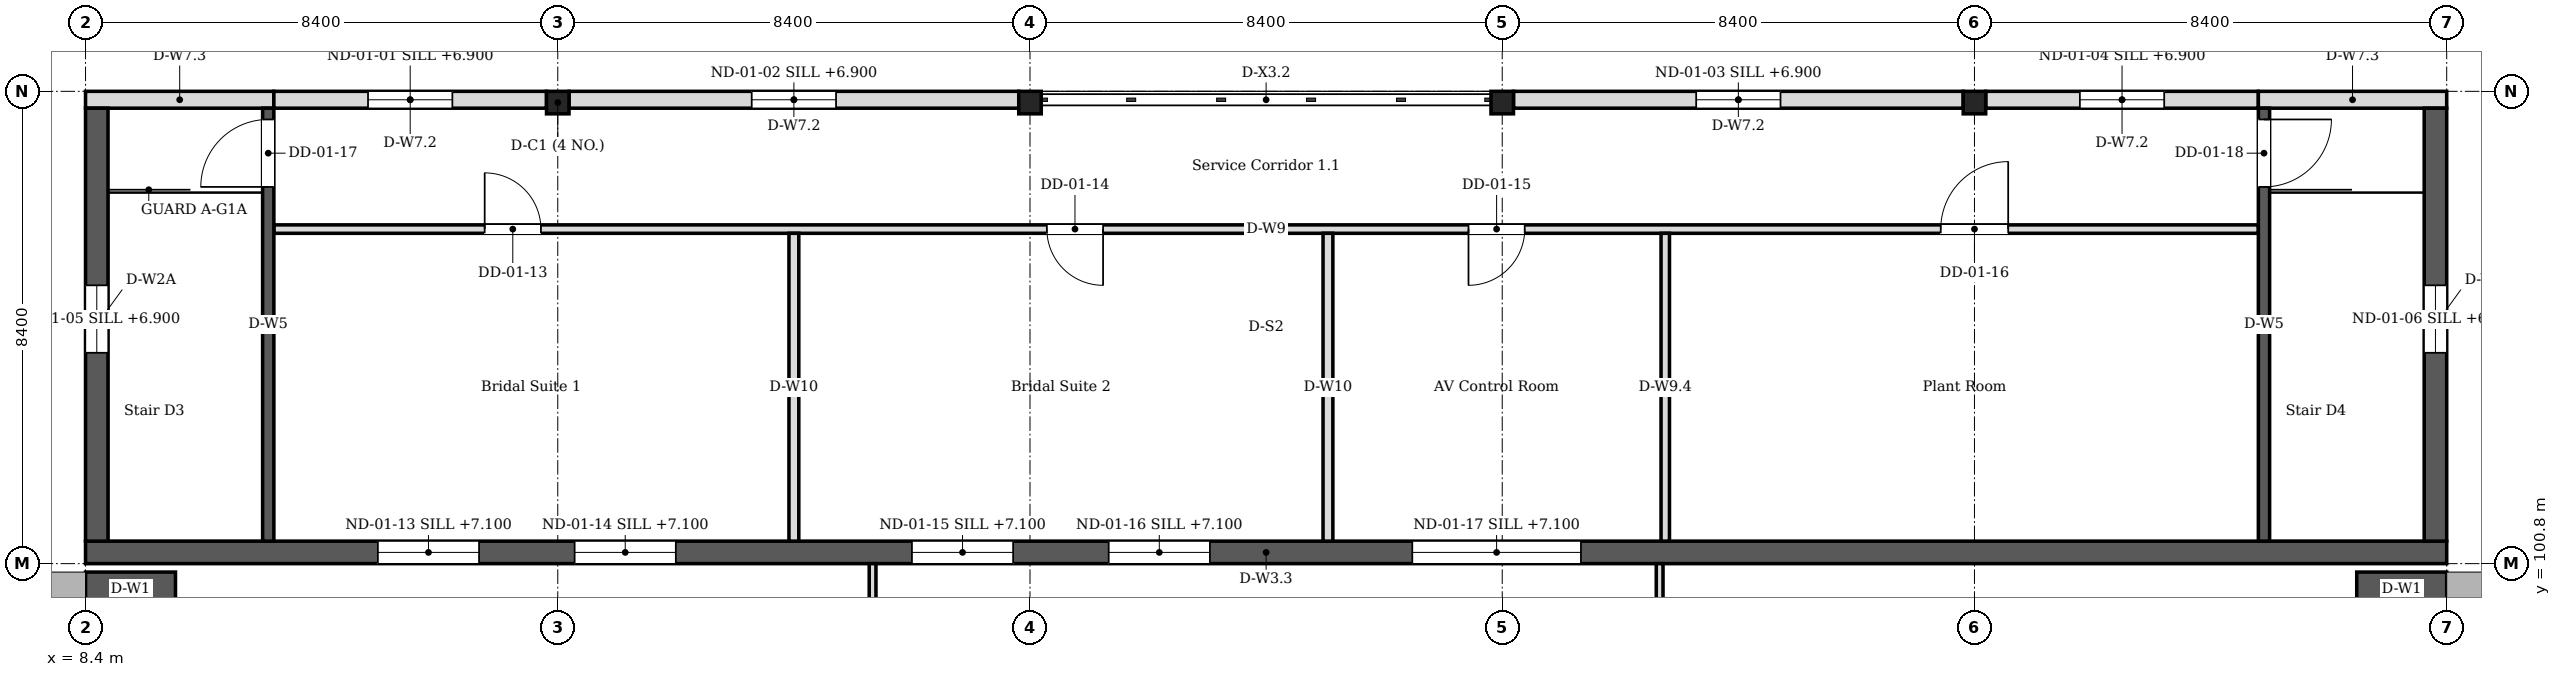
"""IFC4 building model, lengths in metres.
Left out: names, types, materials, properties, quantities, classifications, styles, units other than length and angle.
Written with IfcOpenShell. Run it as: python <this file> out.ifc"""

import sys

from ifc_helpers import new_model, si_unit, direction, frame, frame_2d, origin, origin_2d, place, context, subcontext, project, spatial, rectangle, i_section, extrude, element, fill, save


model = new_model("IFC4")
c1 = context("Model", 3, precision=1e-05, world=origin(), true_north=direction((0.0, 1.0)))
c2 = subcontext(c1, "Body", "Model", "MODEL_VIEW")
j1 = project(units=[si_unit("LENGTHUNIT", "METRE"), si_unit("PLANEANGLEUNIT", "RADIAN")], contexts=[c1])
p1 = place(None, origin())
s1 = spatial("IfcSite", under=j1, at=p1, CompositionType="ELEMENT")
p2 = place(p1, origin())
s2 = spatial("IfcBuilding", under=s1, at=p2, CompositionType="ELEMENT")
p3 = place(p2, origin())
s3 = spatial("IfcBuildingStorey", under=s2, at=p3, CompositionType="ELEMENT", Elevation=0.0)
p4 = place(p3, frame((8.4, 100.35, 0.0), z_axis=(0.0, 0.0, 1.0), x_axis=(1.0, 0.0, 0.0)))
e1 = element("IfcWall", 1, at=p4, inside=s3, PredefinedType="SOLIDWALL", context=c2, shape_type="SweptSolid", body=[
    extrude(rectangle(XDim=1.6, YDim=0.6, at=frame_2d((0.8, 0.0))), origin(), (0.0, 0.0, 1.0), 14.467),
])
p5 = place(p3, frame((50.4, 100.35, 0.0), z_axis=(0.0, 0.0, 1.0), x_axis=(-1.0, 0.0, 0.0)))
e2 = element("IfcWall", 2, at=p5, inside=s3, PredefinedType="SOLIDWALL", context=c2, shape_type="SweptSolid", body=[
    extrude(rectangle(XDim=1.6, YDim=0.6, at=frame_2d((0.8, 0.0))), origin(), (0.0, 0.0, 1.0), 14.467),
])
p6 = place(p2, frame((0.0, 0.0, 6.0)))
s4 = spatial("IfcBuildingStorey", under=s2, at=p6, CompositionType="ELEMENT", Elevation=6.0)
p7 = place(p6, frame((8.4, 101.0, 0.0), z_axis=(0.0, 0.0, 1.0), x_axis=(1.0, 0.0, 0.0)))
e3 = element("IfcWall", 3, at=p7, inside=s4, PredefinedType="SOLIDWALL", context=c2, shape_type="SweptSolid", body=[
    extrude(rectangle(XDim=42.0, YDim=0.4, at=frame_2d((21.0, 0.0))), origin(), (0.0, 0.0, 1.0), 3.92),
])
p8 = place(p7, frame((5.2, 0.0, 1.1)))
e4 = element("IfcOpeningElement", 4, at=p8, cuts=e3, PredefinedType="OPENING", context=c2, shape_type="SweptSolid", body=[
    extrude(rectangle(XDim=1.8, YDim=1.5, at=frame_2d((0.9, 0.75))), frame((0.0, 0.21, 0.0), z_axis=(0.0, -1.0, 0.0), x_axis=(1.0, 0.0, 0.0)), (0.0, 0.0, 1.0), 0.42),
])
p9 = place(p7, frame((8.7, 0.0, 1.1)))
e5 = element("IfcOpeningElement", 5, at=p9, cuts=e3, PredefinedType="OPENING", context=c2, shape_type="SweptSolid", body=[
    extrude(rectangle(XDim=1.8, YDim=1.5, at=frame_2d((0.9, 0.75))), frame((0.0, 0.21, 0.0), z_axis=(0.0, -1.0, 0.0), x_axis=(1.0, 0.0, 0.0)), (0.0, 0.0, 1.0), 0.42),
])
p10 = place(p7, frame((14.7, 0.0, 1.1)))
e6 = element("IfcOpeningElement", 6, at=p10, cuts=e3, PredefinedType="OPENING", context=c2, shape_type="SweptSolid", body=[
    extrude(rectangle(XDim=1.8, YDim=1.5, at=frame_2d((0.9, 0.75))), frame((0.0, 0.21, 0.0), z_axis=(0.0, -1.0, 0.0), x_axis=(1.0, 0.0, 0.0)), (0.0, 0.0, 1.0), 0.42),
])
p11 = place(p7, frame((18.2, 0.0, 1.1)))
e7 = element("IfcOpeningElement", 7, at=p11, cuts=e3, PredefinedType="OPENING", context=c2, shape_type="SweptSolid", body=[
    extrude(rectangle(XDim=1.8, YDim=1.5, at=frame_2d((0.9, 0.75))), frame((0.0, 0.21, 0.0), z_axis=(0.0, -1.0, 0.0), x_axis=(1.0, 0.0, 0.0)), (0.0, 0.0, 1.0), 0.42),
])
p12 = place(p7, frame((23.6, 0.0, 1.1)))
e8 = element("IfcOpeningElement", 8, at=p12, cuts=e3, PredefinedType="OPENING", context=c2, shape_type="SweptSolid", body=[
    extrude(rectangle(XDim=3.0, YDim=1.5, at=frame_2d((1.5, 0.75))), frame((0.0, 0.21, 0.0), z_axis=(0.0, -1.0, 0.0), x_axis=(1.0, 0.0, 0.0)), (0.0, 0.0, 1.0), 0.42),
])
p13 = place(p6, frame((8.6, 101.2, 0.0), z_axis=(0.0, 0.0, 1.0), x_axis=(0.0, 1.0, 0.0)))
e9 = element("IfcWall", 9, at=p13, inside=s4, PredefinedType="SOLIDWALL", context=c2, shape_type="SweptSolid", body=[
    extrude(rectangle(XDim=7.7, YDim=0.4, at=frame_2d((3.85, 0.0))), origin(), (0.0, 0.0, 1.0), 3.92),
])
p14 = place(p13, frame((3.35, 0.0, 0.9)))
e10 = element("IfcOpeningElement", 10, at=p14, cuts=e9, PredefinedType="OPENING", context=c2, shape_type="SweptSolid", body=[
    extrude(rectangle(XDim=1.2, YDim=1.5, at=frame_2d((0.6, 0.75))), frame((0.0, 0.21, 0.0), z_axis=(0.0, -1.0, 0.0), x_axis=(1.0, 0.0, 0.0)), (0.0, 0.0, 1.0), 0.42),
])
p15 = place(p6, frame((11.65, 101.2, 0.0), z_axis=(0.0, 0.0, 1.0), x_axis=(0.0, 1.0, 0.0)))
e11 = element("IfcWall", 11, at=p15, inside=s4, PredefinedType="SOLIDWALL", context=c2, shape_type="SweptSolid", body=[
    extrude(rectangle(XDim=7.7, YDim=0.2, at=frame_2d((3.85, 0.0))), origin(), (0.0, 0.0, 1.0), 3.92),
])
p16 = place(p15, frame((6.3, 0.0, 0.0)))
e12 = element("IfcOpeningElement", 12, at=p16, cuts=e11, PredefinedType="OPENING", context=c2, shape_type="SweptSolid", body=[
    extrude(rectangle(XDim=1.2, YDim=2.1, at=frame_2d((0.6, 1.05))), frame((0.0, 0.11, 0.0), z_axis=(0.0, -1.0, 0.0), x_axis=(1.0, 0.0, 0.0)), (0.0, 0.0, 1.0), 0.22),
])
p17 = place(p6, frame((50.2, 101.2, 0.0), z_axis=(0.0, 0.0, 1.0), x_axis=(0.0, 1.0, 0.0)))
e13 = element("IfcWall", 13, at=p17, inside=s4, PredefinedType="SOLIDWALL", context=c2, shape_type="SweptSolid", body=[
    extrude(rectangle(XDim=7.7, YDim=0.4, at=frame_2d((3.85, 0.0))), origin(), (0.0, 0.0, 1.0), 3.92),
])
p18 = place(p17, frame((3.35, 0.0, 0.9)))
e14 = element("IfcOpeningElement", 14, at=p18, cuts=e13, PredefinedType="OPENING", context=c2, shape_type="SweptSolid", body=[
    extrude(rectangle(XDim=1.2, YDim=1.5, at=frame_2d((0.6, 0.75))), frame((0.0, 0.21, 0.0), z_axis=(0.0, -1.0, 0.0), x_axis=(1.0, 0.0, 0.0)), (0.0, 0.0, 1.0), 0.42),
])
p19 = place(p6, frame((47.15, 101.2, 0.0), z_axis=(0.0, 0.0, 1.0), x_axis=(0.0, 1.0, 0.0)))
e15 = element("IfcWall", 15, at=p19, inside=s4, PredefinedType="SOLIDWALL", context=c2, shape_type="SweptSolid", body=[
    extrude(rectangle(XDim=7.7, YDim=0.2, at=frame_2d((3.85, 0.0))), origin(), (0.0, 0.0, 1.0), 3.92),
])
p20 = place(p19, frame((6.3, 0.0, 0.0)))
e16 = element("IfcOpeningElement", 16, at=p20, cuts=e15, PredefinedType="OPENING", context=c2, shape_type="SweptSolid", body=[
    extrude(rectangle(XDim=1.2, YDim=2.1, at=frame_2d((0.6, 1.05))), frame((0.0, 0.11, 0.0), z_axis=(0.0, -1.0, 0.0), x_axis=(1.0, 0.0, 0.0)), (0.0, 0.0, 1.0), 0.22),
])
for number, where, z_axis, x_axis in (
    (17, (16.8, 109.0, 0.0), (0.0, 0.0, 1.0), (1.0, 0.0, 0.0)),
    (18, (25.2, 109.0, 0.0), (0.0, 0.0, 1.0), (1.0, 0.0, 0.0)),
    (19, (33.6, 109.0, 0.0), (0.0, 0.0, 1.0), (1.0, 0.0, 0.0)),
    (20, (42.0, 109.0, 0.0), (0.0, 0.0, 1.0), (1.0, 0.0, 0.0)),
):
    element("IfcColumn", number, at=place(p6, frame(where, z_axis=z_axis, x_axis=x_axis)), inside=s4, PredefinedType="COLUMN", context=c2, shape_type="SweptSolid", body=[
        extrude(i_section(OverallWidth=0.4, OverallDepth=0.4, WebThickness=0.013, FlangeThickness=0.021, FilletRadius=0.022, at=origin_2d()), origin(), (0.0, 0.0, 1.0), 4.2),
    ])
p21 = place(p6, frame((8.4, 109.05, 0.0), z_axis=(0.0, 0.0, 1.0), x_axis=(1.0, 0.0, 0.0)))
e21 = element("IfcWall", 21, at=p21, inside=s4, PredefinedType="SOLIDWALL", context=c2, shape_type="SweptSolid", body=[
    extrude(rectangle(XDim=3.35, YDim=0.3, at=frame_2d((1.675, 0.0))), origin(), (0.0, 0.0, 1.0), 3.92),
])
p22 = place(p6, frame((11.75, 109.05, 0.0), z_axis=(0.0, 0.0, 1.0), x_axis=(1.0, 0.0, 0.0)))
e22 = element("IfcWall", 22, at=p22, inside=s4, PredefinedType="SOLIDWALL", context=c2, shape_type="SweptSolid", body=[
    extrude(rectangle(XDim=4.85, YDim=0.3, at=frame_2d((2.425, 0.0))), origin(), (0.0, 0.0, 1.0), 3.42),
])
p23 = place(p22, frame((1.675, 0.0, 0.9)))
e23 = element("IfcOpeningElement", 23, at=p23, cuts=e22, PredefinedType="OPENING", context=c2, shape_type="SweptSolid", body=[
    extrude(rectangle(XDim=1.5, YDim=1.2, at=frame_2d((0.75, 0.6))), frame((0.0, 0.16, 0.0), z_axis=(0.0, -1.0, 0.0), x_axis=(1.0, 0.0, 0.0)), (0.0, 0.0, 1.0), 0.32),
])
p24 = place(p6, frame((17.0, 109.05, 0.0), z_axis=(0.0, 0.0, 1.0), x_axis=(1.0, 0.0, 0.0)))
e24 = element("IfcWall", 24, at=p24, inside=s4, PredefinedType="SOLIDWALL", context=c2, shape_type="SweptSolid", body=[
    extrude(rectangle(XDim=8.0, YDim=0.3, at=frame_2d((4.0, 0.0))), origin(), (0.0, 0.0, 1.0), 3.42),
])
p25 = place(p24, frame((3.25, 0.0, 0.9)))
e25 = element("IfcOpeningElement", 25, at=p25, cuts=e24, PredefinedType="OPENING", context=c2, shape_type="SweptSolid", body=[
    extrude(rectangle(XDim=1.5, YDim=1.2, at=frame_2d((0.75, 0.6))), frame((0.0, 0.16, 0.0), z_axis=(0.0, -1.0, 0.0), x_axis=(1.0, 0.0, 0.0)), (0.0, 0.0, 1.0), 0.32),
])
p26 = place(p6, frame((33.8, 109.05, 0.0), z_axis=(0.0, 0.0, 1.0), x_axis=(1.0, 0.0, 0.0)))
e26 = element("IfcWall", 26, at=p26, inside=s4, PredefinedType="SOLIDWALL", context=c2, shape_type="SweptSolid", body=[
    extrude(rectangle(XDim=8.0, YDim=0.3, at=frame_2d((4.0, 0.0))), origin(), (0.0, 0.0, 1.0), 3.42),
])
p27 = place(p26, frame((3.25, 0.0, 0.9)))
e27 = element("IfcOpeningElement", 27, at=p27, cuts=e26, PredefinedType="OPENING", context=c2, shape_type="SweptSolid", body=[
    extrude(rectangle(XDim=1.5, YDim=1.2, at=frame_2d((0.75, 0.6))), frame((0.0, 0.16, 0.0), z_axis=(0.0, -1.0, 0.0), x_axis=(1.0, 0.0, 0.0)), (0.0, 0.0, 1.0), 0.32),
])
p28 = place(p6, frame((42.2, 109.05, 0.0), z_axis=(0.0, 0.0, 1.0), x_axis=(1.0, 0.0, 0.0)))
e28 = element("IfcWall", 28, at=p28, inside=s4, PredefinedType="SOLIDWALL", context=c2, shape_type="SweptSolid", body=[
    extrude(rectangle(XDim=4.85, YDim=0.3, at=frame_2d((2.425, 0.0))), origin(), (0.0, 0.0, 1.0), 3.42),
])
p29 = place(p28, frame((1.675, 0.0, 0.9)))
e29 = element("IfcOpeningElement", 29, at=p29, cuts=e28, PredefinedType="OPENING", context=c2, shape_type="SweptSolid", body=[
    extrude(rectangle(XDim=1.5, YDim=1.2, at=frame_2d((0.75, 0.6))), frame((0.0, 0.16, 0.0), z_axis=(0.0, -1.0, 0.0), x_axis=(1.0, 0.0, 0.0)), (0.0, 0.0, 1.0), 0.32),
])
p30 = place(p6, frame((47.05, 109.05, 0.0), z_axis=(0.0, 0.0, 1.0), x_axis=(1.0, 0.0, 0.0)))
e30 = element("IfcWall", 30, at=p30, inside=s4, PredefinedType="SOLIDWALL", context=c2, shape_type="SweptSolid", body=[
    extrude(rectangle(XDim=3.35, YDim=0.3, at=frame_2d((1.675, 0.0))), origin(), (0.0, 0.0, 1.0), 3.92),
])
for number, where, z_axis, x_axis in (
    (31, (22.4, 67.2, 0.0), (0.0, 0.0, 1.0), (0.0, 1.0, 0.0)),
    (32, (36.4, 67.2, 0.0), (0.0, 0.0, 1.0), (0.0, 1.0, 0.0)),
):
    element("IfcWall", number, at=place(p3, frame(where, z_axis=z_axis, x_axis=x_axis)), inside=s3, PredefinedType="MOVABLE", context=c2, shape_type="SweptSolid", body=[
        extrude(rectangle(XDim=33.6, YDim=0.12, at=frame_2d((16.8, 0.0))), origin(), (0.0, 0.0, 1.0), 14.467),
    ])
p31 = place(p6, frame((11.75, 106.75, 0.0), z_axis=(0.0, 0.0, 1.0), x_axis=(1.0, 0.0, 0.0)))
e33 = element("IfcWall", 33, at=p31, inside=s4, PredefinedType="PARTITIONING", context=c2, shape_type="SweptSolid", body=[
    extrude(rectangle(XDim=35.3, YDim=0.15, at=frame_2d((17.65, 0.0))), origin(), (0.0, 0.0, 1.0), 3.92),
])
p32 = place(p31, frame((3.75, 0.0, 0.0)))
e34 = element("IfcOpeningElement", 34, at=p32, cuts=e33, PredefinedType="OPENING", context=c2, shape_type="SweptSolid", body=[
    extrude(rectangle(XDim=1.0, YDim=2.1, at=frame_2d((0.5, 1.05))), frame((0.0, 0.085, 0.0), z_axis=(0.0, -1.0, 0.0), x_axis=(1.0, 0.0, 0.0)), (0.0, 0.0, 1.0), 0.17),
])
p33 = place(p31, frame((13.75, 0.0, 0.0)))
e35 = element("IfcOpeningElement", 35, at=p33, cuts=e33, PredefinedType="OPENING", context=c2, shape_type="SweptSolid", body=[
    extrude(rectangle(XDim=1.0, YDim=2.1, at=frame_2d((0.5, 1.05))), frame((0.0, 0.085, 0.0), z_axis=(0.0, -1.0, 0.0), x_axis=(1.0, 0.0, 0.0)), (0.0, 0.0, 1.0), 0.17),
])
p34 = place(p31, frame((21.25, 0.0, 0.0)))
e36 = element("IfcOpeningElement", 36, at=p34, cuts=e33, PredefinedType="OPENING", context=c2, shape_type="SweptSolid", body=[
    extrude(rectangle(XDim=1.0, YDim=2.1, at=frame_2d((0.5, 1.05))), frame((0.0, 0.085, 0.0), z_axis=(0.0, -1.0, 0.0), x_axis=(1.0, 0.0, 0.0)), (0.0, 0.0, 1.0), 0.17),
])
p35 = place(p31, frame((29.65, 0.0, 0.0)))
e37 = element("IfcOpeningElement", 37, at=p35, cuts=e33, PredefinedType="OPENING", context=c2, shape_type="SweptSolid", body=[
    extrude(rectangle(XDim=1.2, YDim=2.1, at=frame_2d((0.6, 1.05))), frame((0.0, 0.085, 0.0), z_axis=(0.0, -1.0, 0.0), x_axis=(1.0, 0.0, 0.0)), (0.0, 0.0, 1.0), 0.17),
])
for number, where, z_axis, x_axis in (
    (38, (21.0, 101.2, 0.0), (0.0, 0.0, 1.0), (0.0, 1.0, 0.0)),
    (39, (30.5, 101.2, 0.0), (0.0, 0.0, 1.0), (0.0, 1.0, 0.0)),
):
    element("IfcWall", number, at=place(p6, frame(where, z_axis=z_axis, x_axis=x_axis)), inside=s4, PredefinedType="PARTITIONING", context=c2, shape_type="SweptSolid", body=[
        extrude(rectangle(XDim=5.475, YDim=0.175, at=frame_2d((2.738, 0.0))), origin(), (0.0, 0.0, 1.0), 3.92),
    ])
p36 = place(p6, frame((36.5, 101.2, 0.0), z_axis=(0.0, 0.0, 1.0), x_axis=(0.0, 1.0, 0.0)))
e40 = element("IfcWall", 40, at=p36, inside=s4, PredefinedType="PARTITIONING", context=c2, shape_type="SweptSolid", body=[
    extrude(rectangle(XDim=5.475, YDim=0.15, at=frame_2d((2.738, 0.0))), origin(), (0.0, 0.0, 1.0), 3.92),
])
p37 = place(p23, origin())
e41 = element("IfcWindow", 41, at=p37, inside=s4, PartitioningType="SINGLE_PANEL", PredefinedType="WINDOW", context=c2, shape_type="SweptSolid", body=[
    extrude(rectangle(XDim=1.5, YDim=1.2, at=frame_2d((0.75, 0.6))), frame((0.0, 0.03, 0.0), z_axis=(0.0, -1.0, 0.0), x_axis=(1.0, 0.0, 0.0)), (0.0, 0.0, 1.0), 0.06),
])
fill(e23, e41)
p38 = place(p25, origin())
e42 = element("IfcWindow", 42, at=p38, inside=s4, PartitioningType="SINGLE_PANEL", PredefinedType="WINDOW", context=c2, shape_type="SweptSolid", body=[
    extrude(rectangle(XDim=1.5, YDim=1.2, at=frame_2d((0.75, 0.6))), frame((0.0, 0.03, 0.0), z_axis=(0.0, -1.0, 0.0), x_axis=(1.0, 0.0, 0.0)), (0.0, 0.0, 1.0), 0.06),
])
fill(e25, e42)
p39 = place(p27, origin())
e43 = element("IfcWindow", 43, at=p39, inside=s4, PartitioningType="SINGLE_PANEL", PredefinedType="WINDOW", context=c2, shape_type="SweptSolid", body=[
    extrude(rectangle(XDim=1.5, YDim=1.2, at=frame_2d((0.75, 0.6))), frame((0.0, 0.03, 0.0), z_axis=(0.0, -1.0, 0.0), x_axis=(1.0, 0.0, 0.0)), (0.0, 0.0, 1.0), 0.06),
])
fill(e27, e43)
p40 = place(p29, origin())
e44 = element("IfcWindow", 44, at=p40, inside=s4, PartitioningType="SINGLE_PANEL", PredefinedType="WINDOW", context=c2, shape_type="SweptSolid", body=[
    extrude(rectangle(XDim=1.5, YDim=1.2, at=frame_2d((0.75, 0.6))), frame((0.0, 0.03, 0.0), z_axis=(0.0, -1.0, 0.0), x_axis=(1.0, 0.0, 0.0)), (0.0, 0.0, 1.0), 0.06),
])
fill(e29, e44)
p41 = place(p14, origin())
e45 = element("IfcWindow", 45, at=p41, inside=s4, PartitioningType="SINGLE_PANEL", PredefinedType="WINDOW", context=c2, shape_type="SweptSolid", body=[
    extrude(rectangle(XDim=1.2, YDim=1.5, at=frame_2d((0.6, 0.75))), frame((0.0, 0.03, 0.0), z_axis=(0.0, -1.0, 0.0), x_axis=(1.0, 0.0, 0.0)), (0.0, 0.0, 1.0), 0.06),
])
fill(e10, e45)
p42 = place(p18, origin())
e46 = element("IfcWindow", 46, at=p42, inside=s4, PartitioningType="SINGLE_PANEL", PredefinedType="WINDOW", context=c2, shape_type="SweptSolid", body=[
    extrude(rectangle(XDim=1.2, YDim=1.5, at=frame_2d((0.6, 0.75))), frame((0.0, 0.03, 0.0), z_axis=(0.0, -1.0, 0.0), x_axis=(1.0, 0.0, 0.0)), (0.0, 0.0, 1.0), 0.06),
])
fill(e14, e46)
p43 = place(p32, origin())
e47 = element("IfcDoor", 47, at=p43, inside=s4, OperationType="SINGLE_SWING_LEFT", PredefinedType="DOOR", context=c2, shape_type="SweptSolid", body=[
    extrude(rectangle(XDim=1.0, YDim=2.1, at=frame_2d((0.5, 1.05))), frame((0.0, 0.025, 0.0), z_axis=(0.0, -1.0, 0.0), x_axis=(1.0, 0.0, 0.0)), (0.0, 0.0, 1.0), 0.05),
])
fill(e34, e47)
p44 = place(p33, origin())
e48 = element("IfcDoor", 48, at=p44, inside=s4, OperationType="SINGLE_SWING_LEFT", PredefinedType="DOOR", context=c2, shape_type="SweptSolid", body=[
    extrude(rectangle(XDim=1.0, YDim=2.1, at=frame_2d((0.5, 1.05))), frame((0.0, 0.025, 0.0), z_axis=(0.0, -1.0, 0.0), x_axis=(1.0, 0.0, 0.0)), (0.0, 0.0, 1.0), 0.05),
])
fill(e35, e48)
p45 = place(p34, origin())
e49 = element("IfcDoor", 49, at=p45, inside=s4, OperationType="SINGLE_SWING_LEFT", PredefinedType="DOOR", context=c2, shape_type="SweptSolid", body=[
    extrude(rectangle(XDim=1.0, YDim=2.1, at=frame_2d((0.5, 1.05))), frame((0.0, 0.025, 0.0), z_axis=(0.0, -1.0, 0.0), x_axis=(1.0, 0.0, 0.0)), (0.0, 0.0, 1.0), 0.05),
])
fill(e36, e49)
p46 = place(p35, origin())
e50 = element("IfcDoor", 50, at=p46, inside=s4, OperationType="SINGLE_SWING_LEFT", PredefinedType="DOOR", context=c2, shape_type="SweptSolid", body=[
    extrude(rectangle(XDim=1.2, YDim=2.1, at=frame_2d((0.6, 1.05))), frame((0.0, 0.025, 0.0), z_axis=(0.0, -1.0, 0.0), x_axis=(1.0, 0.0, 0.0)), (0.0, 0.0, 1.0), 0.05),
])
fill(e37, e50)
p47 = place(p16, origin())
e51 = element("IfcDoor", 51, at=p47, inside=s4, OperationType="SINGLE_SWING_LEFT", PredefinedType="DOOR", context=c2, shape_type="SweptSolid", body=[
    extrude(rectangle(XDim=1.2, YDim=2.1, at=frame_2d((0.6, 1.05))), frame((0.0, 0.025, 0.0), z_axis=(0.0, -1.0, 0.0), x_axis=(1.0, 0.0, 0.0)), (0.0, 0.0, 1.0), 0.05),
])
fill(e12, e51)
p48 = place(p20, origin())
e52 = element("IfcDoor", 52, at=p48, inside=s4, OperationType="SINGLE_SWING_LEFT", PredefinedType="DOOR", context=c2, shape_type="SweptSolid", body=[
    extrude(rectangle(XDim=1.2, YDim=2.1, at=frame_2d((0.6, 1.05))), frame((0.0, 0.025, 0.0), z_axis=(0.0, -1.0, 0.0), x_axis=(1.0, 0.0, 0.0)), (0.0, 0.0, 1.0), 0.05),
])
fill(e16, e52)
p49 = place(p8, origin())
e53 = element("IfcWindow", 53, at=p49, inside=s4, PartitioningType="SINGLE_PANEL", PredefinedType="WINDOW", context=c2, shape_type="SweptSolid", body=[
    extrude(rectangle(XDim=1.8, YDim=1.5, at=frame_2d((0.9, 0.75))), frame((0.0, 0.03, 0.0), z_axis=(0.0, -1.0, 0.0), x_axis=(1.0, 0.0, 0.0)), (0.0, 0.0, 1.0), 0.06),
])
fill(e4, e53)
p50 = place(p9, origin())
e54 = element("IfcWindow", 54, at=p50, inside=s4, PartitioningType="SINGLE_PANEL", PredefinedType="WINDOW", context=c2, shape_type="SweptSolid", body=[
    extrude(rectangle(XDim=1.8, YDim=1.5, at=frame_2d((0.9, 0.75))), frame((0.0, 0.03, 0.0), z_axis=(0.0, -1.0, 0.0), x_axis=(1.0, 0.0, 0.0)), (0.0, 0.0, 1.0), 0.06),
])
fill(e5, e54)
p51 = place(p10, origin())
e55 = element("IfcWindow", 55, at=p51, inside=s4, PartitioningType="SINGLE_PANEL", PredefinedType="WINDOW", context=c2, shape_type="SweptSolid", body=[
    extrude(rectangle(XDim=1.8, YDim=1.5, at=frame_2d((0.9, 0.75))), frame((0.0, 0.03, 0.0), z_axis=(0.0, -1.0, 0.0), x_axis=(1.0, 0.0, 0.0)), (0.0, 0.0, 1.0), 0.06),
])
fill(e6, e55)
p52 = place(p11, origin())
e56 = element("IfcWindow", 56, at=p52, inside=s4, PartitioningType="SINGLE_PANEL", PredefinedType="WINDOW", context=c2, shape_type="SweptSolid", body=[
    extrude(rectangle(XDim=1.8, YDim=1.5, at=frame_2d((0.9, 0.75))), frame((0.0, 0.03, 0.0), z_axis=(0.0, -1.0, 0.0), x_axis=(1.0, 0.0, 0.0)), (0.0, 0.0, 1.0), 0.06),
])
fill(e7, e56)
p53 = place(p12, origin())
e57 = element("IfcWindow", 57, at=p53, inside=s4, PartitioningType="SINGLE_PANEL", PredefinedType="WINDOW", context=c2, shape_type="SweptSolid", body=[
    extrude(rectangle(XDim=3.0, YDim=1.5, at=frame_2d((1.5, 0.75))), frame((0.0, 0.03, 0.0), z_axis=(0.0, -1.0, 0.0), x_axis=(1.0, 0.0, 0.0)), (0.0, 0.0, 1.0), 0.06),
])
fill(e8, e57)
save(model, sys.argv[1])
